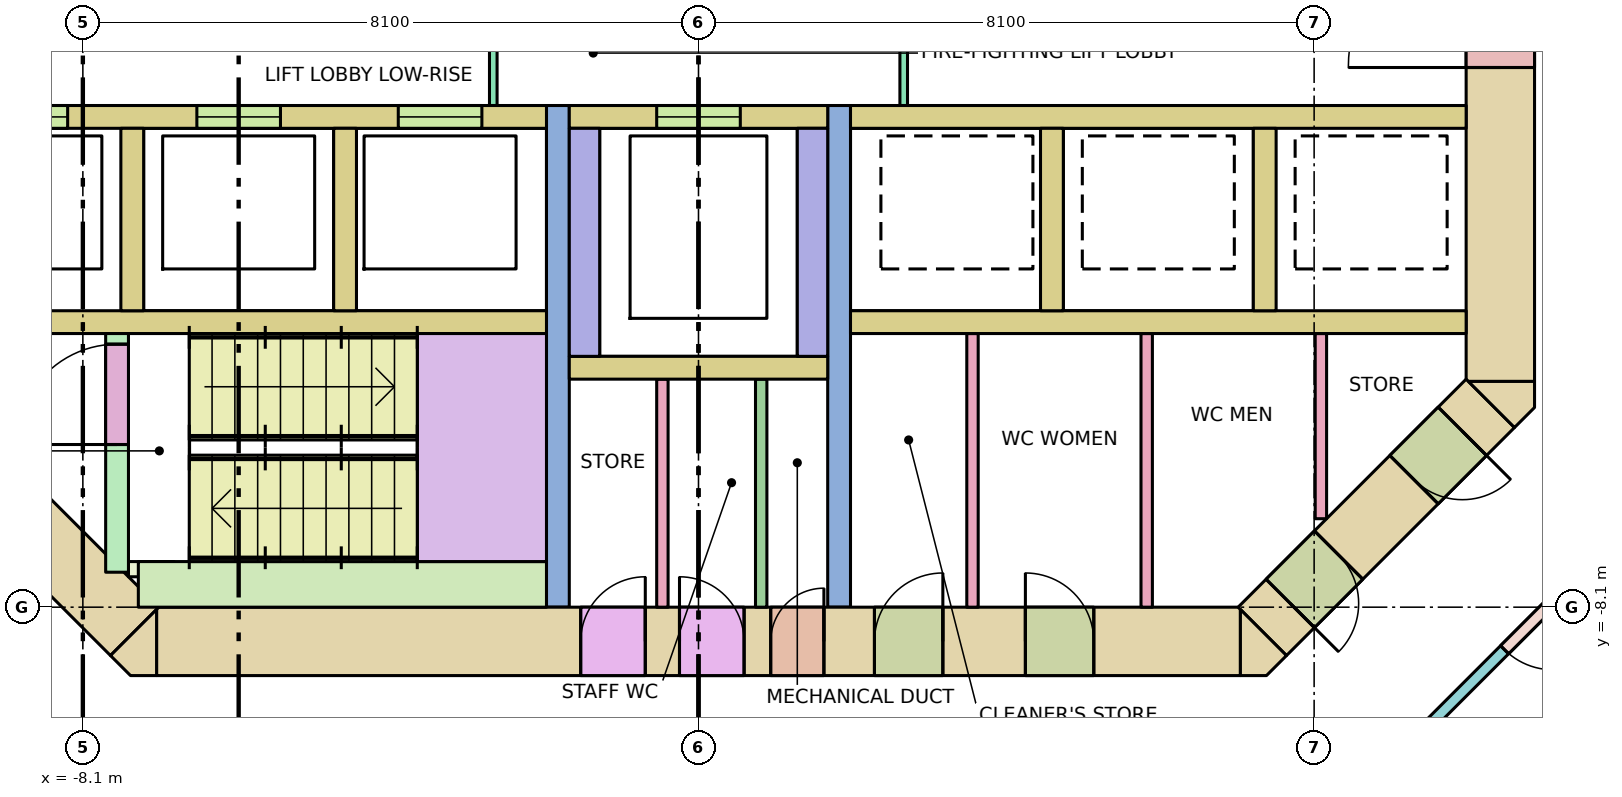
"""IFC4 building model, lengths in metres.
Left out: names, types, materials, properties, quantities, classifications, styles, units other than length and angle.
Written with IfcOpenShell. Run it as: python <this file> out.ifc"""

import sys

from ifc_helpers import new_model, si_unit, direction, frame, frame_2d, origin, place, context, subcontext, project, spatial, polyline, rectangle, outline, extrude, element, fill, save


model = new_model("IFC4")
c1 = context("Model", 3, precision=1e-05, world=origin(), true_north=direction((0.0, 1.0)))
c2 = subcontext(c1, "Body", "Model", "MODEL_VIEW")
j1 = project(units=[si_unit("LENGTHUNIT", "METRE"), si_unit("PLANEANGLEUNIT", "RADIAN")], contexts=[c1])
p1 = place(None, origin())
s1 = spatial("IfcSite", under=j1, at=p1, CompositionType="ELEMENT")
p2 = place(p1, origin())
s2 = spatial("IfcBuilding", under=s1, at=p2, CompositionType="ELEMENT")
p3 = place(p2, frame((0.0, 0.0, 139.0)))
s3 = spatial("IfcBuildingStorey", under=s2, at=p3, CompositionType="ELEMENT", Elevation=139.0)
p4 = place(p3, frame((-7.13, -8.55, -0.28), z_axis=(0.0, 0.0, 1.0), x_axis=(1.0, 0.0, 0.0)))
e1 = element("IfcWall", 1, at=p4, inside=s3, PredefinedType="SHEAR", context=c2, shape_type="SweptSolid", body=[
    extrude(rectangle(XDim=14.26, YDim=0.9, at=frame_2d((7.13, 0.0))), origin(), (0.0, 0.0, 1.0), 3.8),
])
p5 = place(p4, frame((8.08, 0.0, 0.28)))
e2 = element("IfcOpeningElement", 2, at=p5, cuts=e1, PredefinedType="OPENING", context=c2, shape_type="SweptSolid", body=[
    extrude(rectangle(XDim=0.7, YDim=2.1, at=frame_2d((0.35, 1.05))), frame((0.0, 0.46, 0.0), z_axis=(0.0, -1.0, 0.0), x_axis=(1.0, 0.0, 0.0)), (0.0, 0.0, 1.0), 0.92),
])
p6 = place(p4, frame((5.58, 0.0, 0.28)))
e3 = element("IfcOpeningElement", 3, at=p6, cuts=e1, PredefinedType="OPENING", context=c2, shape_type="SweptSolid", body=[
    extrude(rectangle(XDim=0.85, YDim=2.1, at=frame_2d((0.425, 1.05))), frame((0.0, 0.46, 0.0), z_axis=(0.0, -1.0, 0.0), x_axis=(1.0, 0.0, 0.0)), (0.0, 0.0, 1.0), 0.92),
])
p7 = place(p4, frame((6.88, 0.0, 0.28)))
e4 = element("IfcOpeningElement", 4, at=p7, cuts=e1, PredefinedType="OPENING", context=c2, shape_type="SweptSolid", body=[
    extrude(rectangle(XDim=0.85, YDim=2.1, at=frame_2d((0.425, 1.05))), frame((0.0, 0.46, 0.0), z_axis=(0.0, -1.0, 0.0), x_axis=(1.0, 0.0, 0.0)), (0.0, 0.0, 1.0), 0.92),
])
p8 = place(p4, frame((9.445, 0.0, 0.28)))
e5 = element("IfcOpeningElement", 5, at=p8, cuts=e1, PredefinedType="OPENING", context=c2, shape_type="SweptSolid", body=[
    extrude(rectangle(XDim=0.9, YDim=2.1, at=frame_2d((0.45, 1.05))), frame((0.0, 0.46, 0.0), z_axis=(0.0, -1.0, 0.0), x_axis=(1.0, 0.0, 0.0)), (0.0, 0.0, 1.0), 0.92),
])
p9 = place(p4, frame((11.431, 0.0, 0.28)))
e6 = element("IfcOpeningElement", 6, at=p9, cuts=e1, PredefinedType="OPENING", context=c2, shape_type="SweptSolid", body=[
    extrude(rectangle(XDim=0.9, YDim=2.1, at=frame_2d((0.45, 1.05))), frame((0.0, 0.46, 0.0), z_axis=(0.0, -1.0, 0.0), x_axis=(1.0, 0.0, 0.0)), (0.0, 0.0, 1.0), 0.92),
])
p10 = place(p3, frame((10.55, -5.13, -0.28), z_axis=(0.0, 0.0, 1.0), x_axis=(0.0, 1.0, 0.0)))
e7 = element("IfcWall", 7, at=p10, inside=s3, PredefinedType="SHEAR", context=c2, shape_type="SweptSolid", body=[
    extrude(rectangle(XDim=10.26, YDim=0.9, at=frame_2d((5.13, 0.0))), origin(), (0.0, 0.0, 1.0), 3.8),
])
p11 = place(p10, frame((4.13, 0.0, 0.28)))
e8 = element("IfcOpeningElement", 8, at=p11, cuts=e7, PredefinedType="OPENING", context=c2, shape_type="SweptSolid", body=[
    extrude(rectangle(XDim=2.0, YDim=2.1, at=frame_2d((1.0, 1.05))), frame((0.0, 0.46, 0.0), z_axis=(0.0, -1.0, 0.0), x_axis=(1.0, 0.0, 0.0)), (0.0, 0.0, 1.0), 0.92),
])
p12 = place(p3, frame((10.418, -5.418, -0.28), z_axis=(0.0, 0.0, 1.0), x_axis=(-0.707106781187, -0.707106781187, 0.0)))
e9 = element("IfcWall", 9, at=p12, inside=s3, PredefinedType="SHEAR", context=c2, shape_type="SweptSolid", body=[
    extrude(rectangle(XDim=4.243, YDim=0.9, at=frame_2d((2.121, 0.0))), origin(), (0.0, 0.0, 1.0), 3.8),
])
p13 = place(p12, frame((2.823, 0.0, 0.28)))
e10 = element("IfcOpeningElement", 10, at=p13, cuts=e9, PredefinedType="OPENING", context=c2, shape_type="SweptSolid", body=[
    extrude(rectangle(XDim=0.9, YDim=2.1, at=frame_2d((0.45, 1.05))), frame((0.0, 0.46, 0.0), z_axis=(0.0, -1.0, 0.0), x_axis=(1.0, 0.0, 0.0)), (0.0, 0.0, 1.0), 0.92),
])
p14 = place(p12, frame((0.52, 0.0, 0.28)))
e11 = element("IfcOpeningElement", 11, at=p14, cuts=e9, PredefinedType="OPENING", context=c2, shape_type="SweptSolid", body=[
    extrude(rectangle(XDim=0.9, YDim=2.1, at=frame_2d((0.45, 1.05))), frame((0.0, 0.46, 0.0), z_axis=(0.0, -1.0, 0.0), x_axis=(1.0, 0.0, 0.0)), (0.0, 0.0, 1.0), 0.92),
])
p15 = place(p3, frame((-7.418, -8.418, -0.28), z_axis=(0.0, 0.0, 1.0), x_axis=(-0.707106781187, 0.707106781187, 0.0)))
e12 = element("IfcWall", 12, at=p15, inside=s3, PredefinedType="SHEAR", context=c2, shape_type="SweptSolid", body=[
    extrude(rectangle(XDim=4.243, YDim=0.9, at=frame_2d((2.121, 0.0))), origin(), (0.0, 0.0, 1.0), 3.8),
])
p16 = place(p15, frame((2.393, 0.0, 0.28)))
e13 = element("IfcOpeningElement", 13, at=p16, cuts=e12, PredefinedType="OPENING", context=c2, shape_type="SweptSolid", body=[
    extrude(rectangle(XDim=1.2, YDim=2.1, at=frame_2d((0.6, 1.05))), frame((0.0, 0.46, 0.0), z_axis=(0.0, -1.0, 0.0), x_axis=(1.0, 0.0, 0.0)), (0.0, 0.0, 1.0), 0.92),
])
p17 = place(p3, frame((0.0, 0.0, -0.28)))
e14 = element("IfcWall", 14, at=p17, inside=s3, PredefinedType="SHEAR", context=c2, shape_type="SweptSolid", body=[
    extrude(outline(polyline([(-7.473, -9.0), (-7.736, -8.736), (-7.13, -8.13), (-7.13, -9.0), (-7.473, -9.0)])), origin(), (0.0, 0.0, 1.0), 3.8),
])
p18 = place(p3, frame((0.0, 0.0, -0.28)))
e15 = element("IfcWall", 15, at=p18, inside=s3, PredefinedType="SHEAR", context=c2, shape_type="SweptSolid", body=[
    extrude(outline(polyline([(7.473, -9.0), (7.13, -9.0), (7.13, -8.13), (7.736, -8.736), (7.473, -9.0)])), origin(), (0.0, 0.0, 1.0), 3.8),
])
p19 = place(p3, frame((0.0, 0.0, -0.28)))
e16 = element("IfcWall", 16, at=p19, inside=s3, PredefinedType="SHEAR", context=c2, shape_type="SweptSolid", body=[
    extrude(outline(polyline([(11.0, -5.473), (10.736, -5.736), (10.13, -5.13), (11.0, -5.13), (11.0, -5.473)])), origin(), (0.0, 0.0, 1.0), 3.8),
])
for number, where, z_axis, x_axis in (
    (17, (-10.1, -4.35, 0.0), (0.0, 0.0, 1.0), (1.0, 0.0, 0.0)),
    (18, (2.0, -4.35, 0.0), (0.0, 0.0, 1.0), (1.0, 0.0, 0.0)),
):
    element("IfcWall", number, at=place(p3, frame(where, z_axis=z_axis, x_axis=x_axis)), inside=s3, PredefinedType="SOLIDWALL", context=c2, shape_type="SweptSolid", body=[
        extrude(rectangle(XDim=8.1, YDim=0.3, at=frame_2d((4.05, 0.0))), origin(), (0.0, 0.0, 1.0), 3.52),
    ])
p20 = place(p3, frame((-10.1, -1.65, 0.0), z_axis=(0.0, 0.0, 1.0), x_axis=(1.0, 0.0, 0.0)))
e19 = element("IfcWall", 19, at=p20, inside=s3, PredefinedType="SOLIDWALL", context=c2, shape_type="SweptSolid", body=[
    extrude(rectangle(XDim=8.1, YDim=0.3, at=frame_2d((4.05, 0.0))), origin(), (0.0, 0.0, 1.0), 3.52),
])
p21 = place(p20, frame((0.7, 0.0, 0.0)))
e20 = element("IfcOpeningElement", 20, at=p21, cuts=e19, PredefinedType="OPENING", context=c2, shape_type="SweptSolid", body=[
    extrude(rectangle(XDim=1.1, YDim=2.1, at=frame_2d((0.55, 1.05))), frame((0.0, 0.16, 0.0), z_axis=(0.0, -1.0, 0.0), x_axis=(1.0, 0.0, 0.0)), (0.0, 0.0, 1.0), 0.32),
])
p22 = place(p20, frame((3.5, 0.0, 0.0)))
e21 = element("IfcOpeningElement", 21, at=p22, cuts=e19, PredefinedType="OPENING", context=c2, shape_type="SweptSolid", body=[
    extrude(rectangle(XDim=1.1, YDim=2.1, at=frame_2d((0.55, 1.05))), frame((0.0, 0.16, 0.0), z_axis=(0.0, -1.0, 0.0), x_axis=(1.0, 0.0, 0.0)), (0.0, 0.0, 1.0), 0.32),
])
p23 = place(p20, frame((6.15, 0.0, 0.0)))
e22 = element("IfcOpeningElement", 22, at=p23, cuts=e19, PredefinedType="OPENING", context=c2, shape_type="SweptSolid", body=[
    extrude(rectangle(XDim=1.1, YDim=2.1, at=frame_2d((0.55, 1.05))), frame((0.0, 0.16, 0.0), z_axis=(0.0, -1.0, 0.0), x_axis=(1.0, 0.0, 0.0)), (0.0, 0.0, 1.0), 0.32),
])
p24 = place(p3, frame((2.0, -1.65, 0.0), z_axis=(0.0, 0.0, 1.0), x_axis=(1.0, 0.0, 0.0)))
e23 = element("IfcWall", 23, at=p24, inside=s3, PredefinedType="SOLIDWALL", context=c2, shape_type="SweptSolid", body=[
    extrude(rectangle(XDim=8.1, YDim=0.3, at=frame_2d((4.05, 0.0))), origin(), (0.0, 0.0, 1.0), 3.52),
])
for number, where, z_axis, x_axis in (
    (24, (-7.45, -4.2, 0.0), (0.0, 0.0, 1.0), (0.0, 1.0, 0.0)),
    (25, (-4.65, -4.2, 0.0), (0.0, 0.0, 1.0), (0.0, 1.0, 0.0)),
    (26, (4.65, -4.2, 0.0), (0.0, 0.0, 1.0), (0.0, 1.0, 0.0)),
    (27, (7.45, -4.2, 0.0), (0.0, 0.0, 1.0), (0.0, 1.0, 0.0)),
):
    element("IfcWall", number, at=place(p3, frame(where, z_axis=z_axis, x_axis=x_axis)), inside=s3, PredefinedType="SOLIDWALL", context=c2, shape_type="SweptSolid", body=[
        extrude(rectangle(XDim=2.4, YDim=0.3, at=frame_2d((1.2, 0.0))), origin(), (0.0, 0.0, 1.0), 3.52),
    ])
for number, where, z_axis, x_axis in (
    (28, (-1.85, -8.1, 0.0), (0.0, 0.0, 1.0), (0.0, 1.0, 0.0)),
    (29, (1.85, -8.1, 0.0), (0.0, 0.0, 1.0), (0.0, 1.0, 0.0)),
):
    element("IfcWall", number, at=place(p3, frame(where, z_axis=z_axis, x_axis=x_axis)), inside=s3, PredefinedType="SHEAR", context=c2, shape_type="SweptSolid", body=[
        extrude(rectangle(XDim=6.6, YDim=0.3, at=frame_2d((3.3, 0.0))), origin(), (0.0, 0.0, 1.0), 3.52),
    ])
p25 = place(p3, frame((-1.7, -1.65, 0.0), z_axis=(0.0, 0.0, 1.0), x_axis=(1.0, 0.0, 0.0)))
e30 = element("IfcWall", 30, at=p25, inside=s3, PredefinedType="SOLIDWALL", context=c2, shape_type="SweptSolid", body=[
    extrude(rectangle(XDim=3.4, YDim=0.3, at=frame_2d((1.7, 0.0))), origin(), (0.0, 0.0, 1.0), 3.52),
])
p26 = place(p25, frame((1.15, 0.0, 0.0)))
e31 = element("IfcOpeningElement", 31, at=p26, cuts=e30, PredefinedType="OPENING", context=c2, shape_type="SweptSolid", body=[
    extrude(rectangle(XDim=1.1, YDim=2.1, at=frame_2d((0.55, 1.05))), frame((0.0, 0.16, 0.0), z_axis=(0.0, -1.0, 0.0), x_axis=(1.0, 0.0, 0.0)), (0.0, 0.0, 1.0), 0.32),
])
for number, where, z_axis, x_axis in (
    (32, (-1.5, -4.8, 0.0), (0.0, 0.0, 1.0), (0.0, 1.0, 0.0)),
    (33, (1.5, -4.8, 0.0), (0.0, 0.0, 1.0), (0.0, 1.0, 0.0)),
):
    element("IfcWall", number, at=place(p3, frame(where, z_axis=z_axis, x_axis=x_axis)), inside=s3, PredefinedType="SOLIDWALL", context=c2, shape_type="SweptSolid", body=[
        extrude(rectangle(XDim=3.0, YDim=0.4, at=frame_2d((1.5, 0.0))), origin(), (0.0, 0.0, 1.0), 3.52),
    ])
p27 = place(p3, frame((-1.7, -4.95, 0.0), z_axis=(0.0, 0.0, 1.0), x_axis=(1.0, 0.0, 0.0)))
e34 = element("IfcWall", 34, at=p27, inside=s3, PredefinedType="SOLIDWALL", context=c2, shape_type="SweptSolid", body=[
    extrude(rectangle(XDim=3.4, YDim=0.3, at=frame_2d((1.7, 0.0))), origin(), (0.0, 0.0, 1.0), 3.52),
])
p28 = place(p3, frame((-7.65, -7.64, 0.0), z_axis=(0.0, 0.0, 1.0), x_axis=(0.0, 1.0, 0.0)))
e35 = element("IfcWall", 35, at=p28, inside=s3, PredefinedType="SHEAR", context=c2, shape_type="SweptSolid", body=[
    extrude(rectangle(XDim=3.14, YDim=0.3, at=frame_2d((1.57, 0.0))), origin(), (0.0, 0.0, 1.0), 3.52),
])
p29 = place(p28, frame((1.68, 0.0, 0.0)))
e36 = element("IfcOpeningElement", 36, at=p29, cuts=e35, PredefinedType="OPENING", context=c2, shape_type="SweptSolid", body=[
    extrude(rectangle(XDim=1.32, YDim=2.1, at=frame_2d((0.66, 1.05))), frame((0.0, 0.16, 0.0), z_axis=(0.0, -1.0, 0.0), x_axis=(1.0, 0.0, 0.0)), (0.0, 0.0, 1.0), 0.32),
])
p30 = place(p3, frame((-7.5, -7.6, 0.0), z_axis=(0.0, 0.0, 1.0), x_axis=(1.0, 0.0, 0.0)))
e37 = element("IfcWall", 37, at=p30, inside=s3, PredefinedType="SHEAR", context=c2, shape_type="SweptSolid", body=[
    extrude(rectangle(XDim=0.6, YDim=0.2, at=frame_2d((0.3, 0.0))), origin(), (0.0, 0.0, 1.0), 3.52),
])
p31 = place(p3, frame((-7.37, -7.8, 0.0), z_axis=(0.0, 0.0, 1.0), x_axis=(1.0, 0.0, 0.0)))
e38 = element("IfcWall", 38, at=p31, inside=s3, PredefinedType="SHEAR", context=c2, shape_type="SweptSolid", body=[
    extrude(rectangle(XDim=5.37, YDim=0.6, at=frame_2d((2.685, 0.0))), origin(), (0.0, 0.0, 1.0), 3.52),
])
p32 = place(p3, frame((-2.7, -1.5, 0.0), z_axis=(0.0, 0.0, 1.0), x_axis=(0.0, 1.0, 0.0)))
e39 = element("IfcWall", 39, at=p32, inside=s3, PredefinedType="PARTITIONING", context=c2, shape_type="SweptSolid", body=[
    extrude(rectangle(XDim=3.0, YDim=0.1, at=frame_2d((1.5, 0.0))), origin(), (0.0, 0.0, 1.0), 3.52),
])
p33 = place(p32, frame((0.9, 0.0, 0.0)))
e40 = element("IfcOpeningElement", 40, at=p33, cuts=e39, PredefinedType="OPENING", context=c2, shape_type="SweptSolid", body=[
    extrude(rectangle(XDim=1.2, YDim=2.1, at=frame_2d((0.6, 1.05))), frame((0.0, 0.06, 0.0), z_axis=(0.0, -1.0, 0.0), x_axis=(1.0, 0.0, 0.0)), (0.0, 0.0, 1.0), 0.12),
])
p34 = place(p3, frame((2.7, -1.5, 0.0), z_axis=(0.0, 0.0, 1.0), x_axis=(0.0, 1.0, 0.0)))
e41 = element("IfcWall", 41, at=p34, inside=s3, PredefinedType="PARTITIONING", context=c2, shape_type="SweptSolid", body=[
    extrude(rectangle(XDim=3.0, YDim=0.1, at=frame_2d((1.5, 0.0))), origin(), (0.0, 0.0, 1.0), 3.52),
])
p35 = place(p34, frame((0.9, 0.0, 0.0)))
e42 = element("IfcOpeningElement", 42, at=p35, cuts=e41, PredefinedType="OPENING", context=c2, shape_type="SweptSolid", body=[
    extrude(rectangle(XDim=1.2, YDim=2.1, at=frame_2d((0.6, 1.05))), frame((0.0, 0.06, 0.0), z_axis=(0.0, -1.0, 0.0), x_axis=(1.0, 0.0, 0.0)), (0.0, 0.0, 1.0), 0.12),
])
for number, where, z_axis, x_axis in (
    (43, (0.825, -8.1, 0.0), (0.0, 0.0, 1.0), (0.0, 1.0, 0.0)),
    (44, (-0.475, -8.1, 0.0), (0.0, 0.0, 1.0), (0.0, 1.0, 0.0)),
):
    element("IfcWall", number, at=place(p3, frame(where, z_axis=z_axis, x_axis=x_axis)), inside=s3, PredefinedType="PARTITIONING", context=c2, shape_type="SweptSolid", body=[
        extrude(rectangle(XDim=3.0, YDim=0.15, at=frame_2d((1.5, 0.0))), origin(), (0.0, 0.0, 1.0), 3.52),
    ])
for number, where, z_axis, x_axis in (
    (45, (3.605, -8.1, 0.0), (0.0, 0.0, 1.0), (0.0, 1.0, 0.0)),
    (46, (5.897, -8.1, 0.0), (0.0, 0.0, 1.0), (0.0, 1.0, 0.0)),
):
    element("IfcWall", number, at=place(p3, frame(where, z_axis=z_axis, x_axis=x_axis)), inside=s3, PredefinedType="PARTITIONING", context=c2, shape_type="SweptSolid", body=[
        extrude(rectangle(XDim=3.6, YDim=0.15, at=frame_2d((1.8, 0.0))), origin(), (0.0, 0.0, 1.0), 3.52),
    ])
p36 = place(p3, frame((8.189, -6.936, 0.0), z_axis=(0.0, 0.0, 1.0), x_axis=(0.0, 1.0, 0.0)))
e47 = element("IfcWall", 47, at=p36, inside=s3, PredefinedType="PARTITIONING", context=c2, shape_type="SweptSolid", body=[
    extrude(rectangle(XDim=2.436, YDim=0.15, at=frame_2d((1.218, 0.0))), origin(), (0.0, 0.0, 1.0), 3.52),
])
p37 = place(p3, frame((12.938, -6.328, 0.0), z_axis=(0.0, 0.0, 1.0), x_axis=(-0.707088206597, -0.707125355289, 0.0)))
e48 = element("IfcWall", 48, at=p37, inside=s3, PredefinedType="PARTITIONING", context=c2, shape_type="SweptSolid", body=[
    extrude(rectangle(XDim=6.572, YDim=0.15, at=frame_2d((3.286, 0.0))), origin(), (0.0, 0.0, 1.0), 2.67),
])
p38 = place(p37, frame((2.398, 0.0, 0.0)))
e49 = element("IfcOpeningElement", 49, at=p38, cuts=e48, PredefinedType="OPENING", context=c2, shape_type="SweptSolid", body=[
    extrude(rectangle(XDim=0.9, YDim=2.1, at=frame_2d((0.45, 1.05))), frame((0.0, 0.085, 0.0), z_axis=(0.0, -1.0, 0.0), x_axis=(1.0, 0.0, 0.0)), (0.0, 0.0, 1.0), 0.17),
])
p39 = place(p21, origin())
e50 = element("IfcDoor", 50, at=p39, inside=s3, OperationType="DOUBLE_DOOR_SLIDING", PredefinedType="DOOR", context=c2, shape_type="SweptSolid", body=[
    extrude(rectangle(XDim=1.1, YDim=2.1, at=frame_2d((0.55, 1.05))), frame((0.0, 0.025, 0.0), z_axis=(0.0, -1.0, 0.0), x_axis=(1.0, 0.0, 0.0)), (0.0, 0.0, 1.0), 0.05),
])
fill(e20, e50)
p40 = place(p22, origin())
e51 = element("IfcDoor", 51, at=p40, inside=s3, OperationType="DOUBLE_DOOR_SLIDING", PredefinedType="DOOR", context=c2, shape_type="SweptSolid", body=[
    extrude(rectangle(XDim=1.1, YDim=2.1, at=frame_2d((0.55, 1.05))), frame((0.0, 0.025, 0.0), z_axis=(0.0, -1.0, 0.0), x_axis=(1.0, 0.0, 0.0)), (0.0, 0.0, 1.0), 0.05),
])
fill(e21, e51)
p41 = place(p23, origin())
e52 = element("IfcDoor", 52, at=p41, inside=s3, OperationType="DOUBLE_DOOR_SLIDING", PredefinedType="DOOR", context=c2, shape_type="SweptSolid", body=[
    extrude(rectangle(XDim=1.1, YDim=2.1, at=frame_2d((0.55, 1.05))), frame((0.0, 0.025, 0.0), z_axis=(0.0, -1.0, 0.0), x_axis=(1.0, 0.0, 0.0)), (0.0, 0.0, 1.0), 0.05),
])
fill(e22, e52)
p42 = place(p26, origin())
e53 = element("IfcDoor", 53, at=p42, inside=s3, OperationType="DOUBLE_DOOR_SLIDING", PredefinedType="DOOR", context=c2, shape_type="SweptSolid", body=[
    extrude(rectangle(XDim=1.1, YDim=2.1, at=frame_2d((0.55, 1.05))), frame((0.0, 0.025, 0.0), z_axis=(0.0, -1.0, 0.0), x_axis=(1.0, 0.0, 0.0)), (0.0, 0.0, 1.0), 0.05),
])
fill(e31, e53)
p43 = place(p29, origin())
e54 = element("IfcDoor", 54, at=p43, inside=s3, OperationType="DOUBLE_DOOR_SINGLE_SWING", PredefinedType="DOOR", context=c2, shape_type="SweptSolid", body=[
    extrude(rectangle(XDim=1.32, YDim=2.1, at=frame_2d((0.66, 1.05))), frame((0.0, 0.025, 0.0), z_axis=(0.0, -1.0, 0.0), x_axis=(1.0, 0.0, 0.0)), (0.0, 0.0, 1.0), 0.05),
])
fill(e36, e54)
p44 = place(p11, origin())
e55 = element("IfcDoor", 55, at=p44, inside=s3, OperationType="DOUBLE_DOOR_SINGLE_SWING", PredefinedType="DOOR", context=c2, shape_type="SweptSolid", body=[
    extrude(rectangle(XDim=2.0, YDim=2.1, at=frame_2d((1.0, 1.05))), frame((0.0, 0.025, 0.0), z_axis=(0.0, -1.0, 0.0), x_axis=(1.0, 0.0, 0.0)), (0.0, 0.0, 1.0), 0.05),
])
fill(e8, e55)
p45 = place(p5, origin())
e56 = element("IfcDoor", 56, at=p45, inside=s3, OperationType="SINGLE_SWING_RIGHT", PredefinedType="DOOR", context=c2, shape_type="SweptSolid", body=[
    extrude(rectangle(XDim=0.7, YDim=2.1, at=frame_2d((0.35, 1.05))), frame((0.0, 0.025, 0.0), z_axis=(0.0, -1.0, 0.0), x_axis=(1.0, 0.0, 0.0)), (0.0, 0.0, 1.0), 0.05),
])
fill(e2, e56)
p46 = place(p6, origin())
e57 = element("IfcDoor", 57, at=p46, inside=s3, OperationType="SINGLE_SWING_RIGHT", PredefinedType="DOOR", context=c2, shape_type="SweptSolid", body=[
    extrude(rectangle(XDim=0.85, YDim=2.1, at=frame_2d((0.425, 1.05))), frame((0.0, 0.025, 0.0), z_axis=(0.0, -1.0, 0.0), x_axis=(1.0, 0.0, 0.0)), (0.0, 0.0, 1.0), 0.05),
])
fill(e3, e57)
p47 = place(p7, origin())
e58 = element("IfcDoor", 58, at=p47, inside=s3, OperationType="SINGLE_SWING_LEFT", PredefinedType="DOOR", context=c2, shape_type="SweptSolid", body=[
    extrude(rectangle(XDim=0.85, YDim=2.1, at=frame_2d((0.425, 1.05))), frame((0.0, 0.025, 0.0), z_axis=(0.0, -1.0, 0.0), x_axis=(1.0, 0.0, 0.0)), (0.0, 0.0, 1.0), 0.05),
])
fill(e4, e58)
p48 = place(p8, origin())
e59 = element("IfcDoor", 59, at=p48, inside=s3, OperationType="SINGLE_SWING_RIGHT", PredefinedType="DOOR", context=c2, shape_type="SweptSolid", body=[
    extrude(rectangle(XDim=0.9, YDim=2.1, at=frame_2d((0.45, 1.05))), frame((0.0, 0.025, 0.0), z_axis=(0.0, -1.0, 0.0), x_axis=(1.0, 0.0, 0.0)), (0.0, 0.0, 1.0), 0.05),
])
fill(e5, e59)
p49 = place(p9, origin())
e60 = element("IfcDoor", 60, at=p49, inside=s3, OperationType="SINGLE_SWING_LEFT", PredefinedType="DOOR", context=c2, shape_type="SweptSolid", body=[
    extrude(rectangle(XDim=0.9, YDim=2.1, at=frame_2d((0.45, 1.05))), frame((0.0, 0.025, 0.0), z_axis=(0.0, -1.0, 0.0), x_axis=(1.0, 0.0, 0.0)), (0.0, 0.0, 1.0), 0.05),
])
fill(e6, e60)
p50 = place(p13, origin())
e61 = element("IfcDoor", 61, at=p50, inside=s3, OperationType="SINGLE_SWING_RIGHT", PredefinedType="DOOR", context=c2, shape_type="SweptSolid", body=[
    extrude(rectangle(XDim=0.9, YDim=2.1, at=frame_2d((0.45, 1.05))), frame((0.0, 0.025, 0.0), z_axis=(0.0, -1.0, 0.0), x_axis=(1.0, 0.0, 0.0)), (0.0, 0.0, 1.0), 0.05),
])
fill(e10, e61)
p51 = place(p14, origin())
e62 = element("IfcDoor", 62, at=p51, inside=s3, OperationType="SINGLE_SWING_LEFT", PredefinedType="DOOR", context=c2, shape_type="SweptSolid", body=[
    extrude(rectangle(XDim=0.9, YDim=2.1, at=frame_2d((0.45, 1.05))), frame((0.0, 0.025, 0.0), z_axis=(0.0, -1.0, 0.0), x_axis=(1.0, 0.0, 0.0)), (0.0, 0.0, 1.0), 0.05),
])
fill(e11, e62)
p52 = place(p38, origin())
e63 = element("IfcDoor", 63, at=p52, inside=s3, OperationType="SINGLE_SWING_LEFT", PredefinedType="DOOR", context=c2, shape_type="SweptSolid", body=[
    extrude(rectangle(XDim=0.9, YDim=2.1, at=frame_2d((0.45, 1.05))), frame((0.0, 0.025, 0.0), z_axis=(0.0, -1.0, 0.0), x_axis=(1.0, 0.0, 0.0)), (0.0, 0.0, 1.0), 0.05),
])
fill(e49, e63)
save(model, sys.argv[1])
